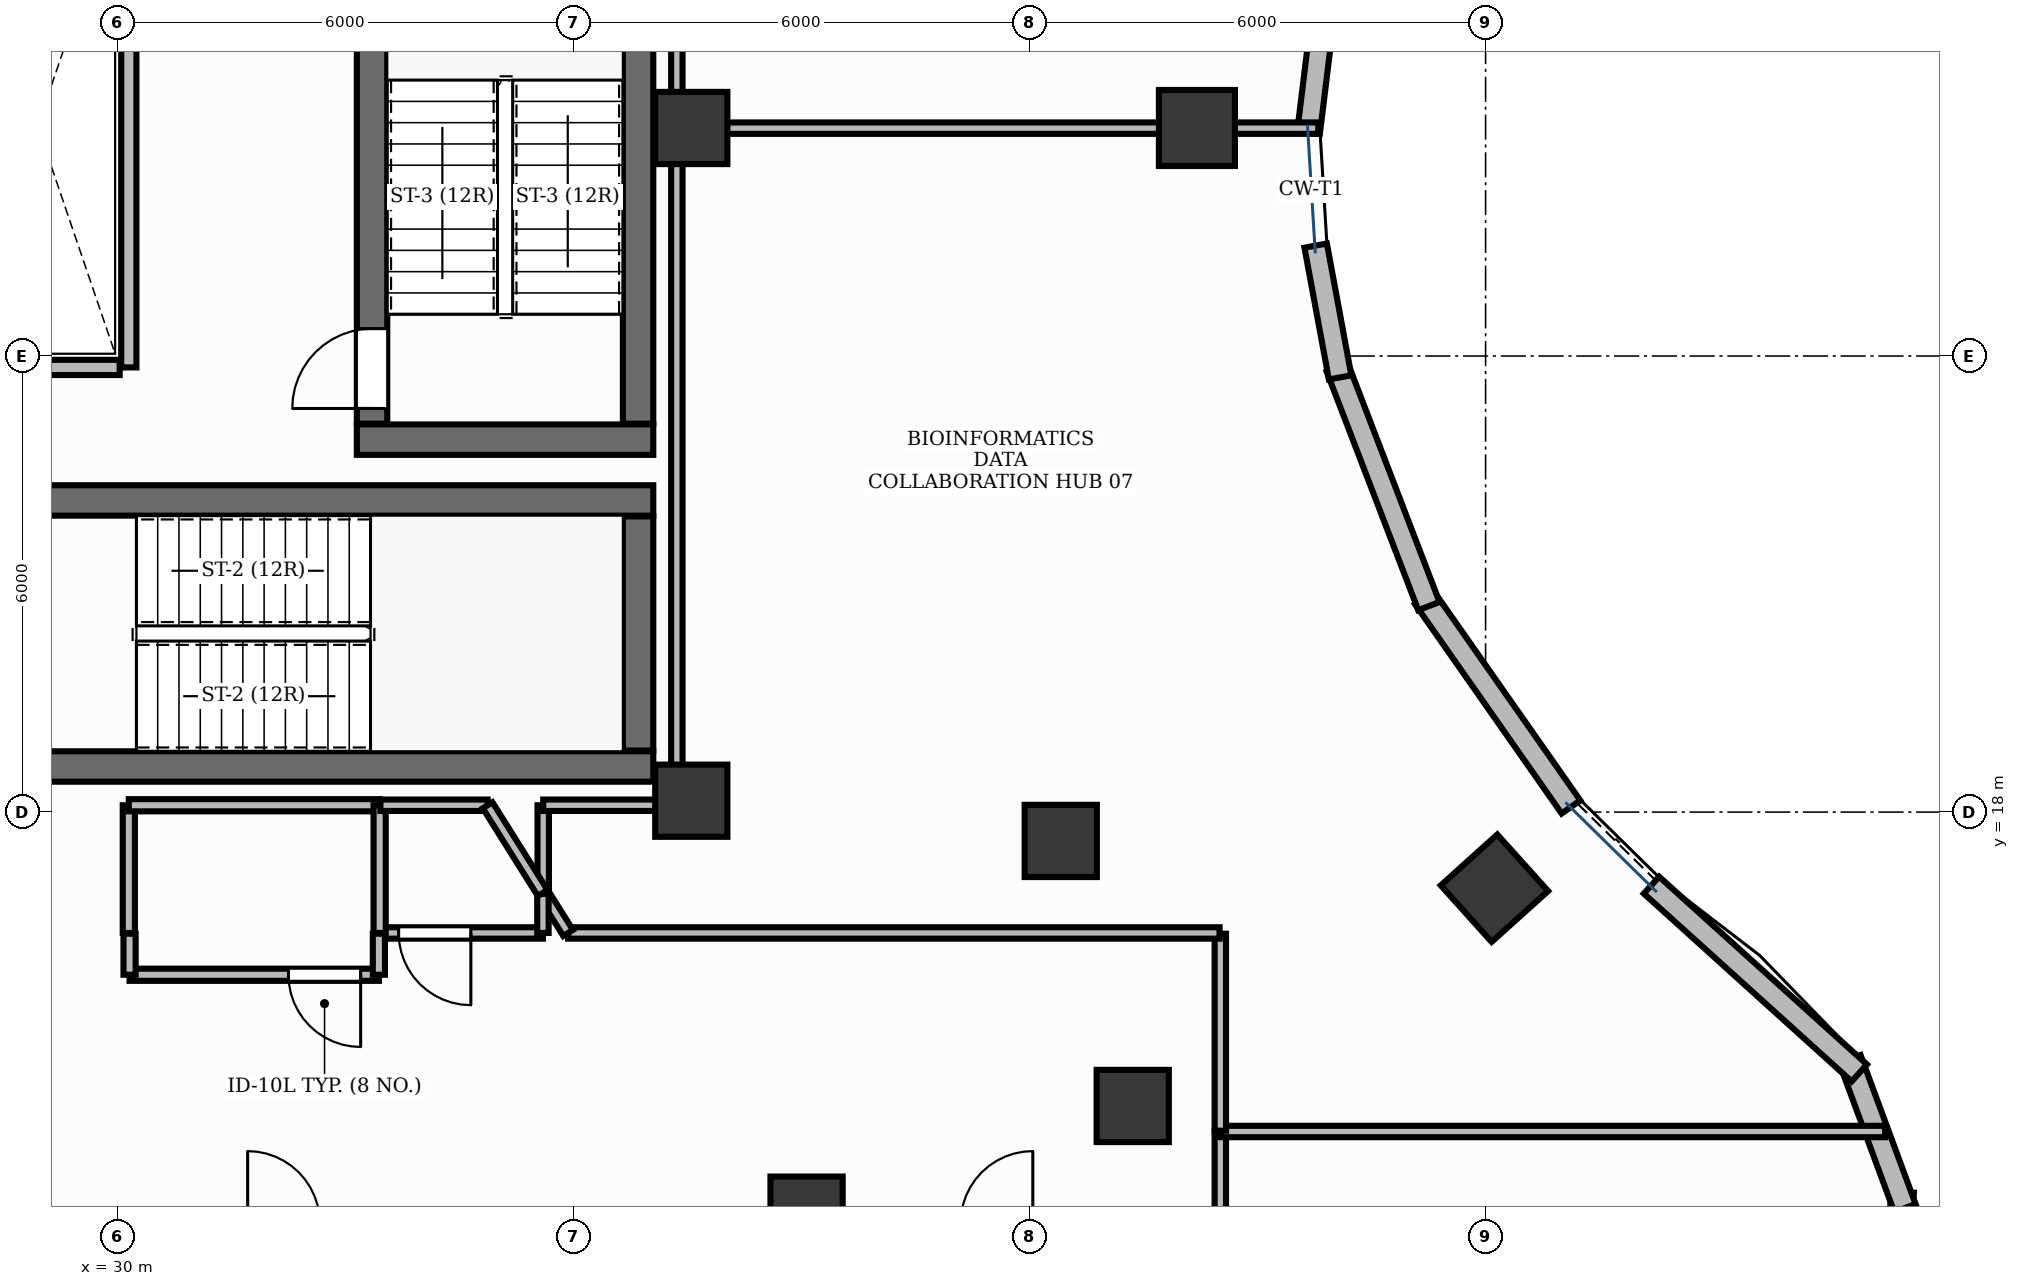
"""IFC4 building model, lengths in metres.
Left out: names, types, materials, properties, quantities, classifications, styles, units other than length and angle.
Written with IfcOpenShell. Run it as: python <this file> out.ifc"""

import sys

from ifc_helpers import new_model, si_unit, direction, frame, frame_2d, origin, origin_2d, place, context, subcontext, project, spatial, rectangle, extrude, element, fill, save


model = new_model("IFC4")
c1 = context("Model", 3, precision=1e-05, world=origin(), true_north=direction((0.0, 1.0)))
c2 = subcontext(c1, "Body", "Model", "MODEL_VIEW")
j1 = project(units=[si_unit("LENGTHUNIT", "METRE"), si_unit("PLANEANGLEUNIT", "RADIAN")], contexts=[c1])
p1 = place(None, origin())
s1 = spatial("IfcSite", under=j1, at=p1, CompositionType="ELEMENT")
p2 = place(p1, origin())
s2 = spatial("IfcBuilding", under=s1, at=p2, CompositionType="ELEMENT")
p3 = place(p2, frame((0.0, 0.0, 235.2)))
s3 = spatial("IfcBuildingStorey", under=s2, at=p3, CompositionType="ELEMENT", Elevation=235.2)
p4 = place(p3, frame((28.852, 18.6, 0.0), z_axis=(0.0, 0.0, 1.0), x_axis=(1.0, 0.0, 0.0)))
e1 = element("IfcWall", 1, at=p4, inside=s3, PredefinedType="SHEAR", context=c2, shape_type="SweptSolid", body=[
    extrude(rectangle(XDim=8.198, YDim=0.4, at=frame_2d((4.099, 0.0))), origin(), (0.0, 0.0, 1.0), 3.9),
])
p5 = place(p3, frame((28.4, 22.1, 0.0), z_axis=(0.0, 0.0, 1.0), x_axis=(1.0, 0.0, 0.0)))
e2 = element("IfcWall", 2, at=p5, inside=s3, PredefinedType="SHEAR", context=c2, shape_type="SweptSolid", body=[
    extrude(rectangle(XDim=8.65, YDim=0.4, at=frame_2d((4.325, 0.0))), origin(), (0.0, 0.0, 1.0), 3.9),
])
p6 = place(p3, frame((36.85, 18.81, 0.0), z_axis=(0.0, 0.0, 1.0), x_axis=(0.0, 1.0, 0.0)))
e3 = element("IfcWall", 3, at=p6, inside=s3, PredefinedType="SHEAR", context=c2, shape_type="SweptSolid", body=[
    extrude(rectangle(XDim=3.08, YDim=0.4, at=frame_2d((1.54, 0.0))), origin(), (0.0, 0.0, 1.0), 3.9),
])
p7 = place(p3, frame((33.15, 22.9, 0.0), z_axis=(0.0, 0.0, 1.0), x_axis=(1.0, 0.0, 0.0)))
e4 = element("IfcWall", 4, at=p7, inside=s3, PredefinedType="SHEAR", context=c2, shape_type="SweptSolid", body=[
    extrude(rectangle(XDim=3.9, YDim=0.4, at=frame_2d((1.95, 0.0))), origin(), (0.0, 0.0, 1.0), 3.9),
])
p8 = place(p3, frame((36.85, 23.11, 0.0), z_axis=(0.0, 0.0, 1.0), x_axis=(0.0, 1.0, 0.0)))
e5 = element("IfcWall", 5, at=p8, inside=s3, PredefinedType="SHEAR", context=c2, shape_type="SweptSolid", body=[
    extrude(rectangle(XDim=7.78, YDim=0.4, at=frame_2d((3.89, 0.0))), origin(), (0.0, 0.0, 1.0), 3.9),
])
p9 = place(p3, frame((33.35, 23.11, 0.0), z_axis=(0.0, 0.0, 1.0), x_axis=(0.0, 1.0, 0.0)))
e6 = element("IfcWall", 6, at=p9, inside=s3, PredefinedType="SHEAR", context=c2, shape_type="SweptSolid", body=[
    extrude(rectangle(XDim=7.78, YDim=0.4, at=frame_2d((3.89, 0.0))), origin(), (0.0, 0.0, 1.0), 3.9),
])
p10 = place(p9, frame((0.2, 0.0, 0.0)))
e7 = element("IfcOpeningElement", 7, at=p10, cuts=e6, PredefinedType="OPENING", context=c2, shape_type="SweptSolid", body=[
    extrude(rectangle(XDim=1.05, YDim=2.15, at=frame_2d((0.525, 1.075))), frame((0.0, 0.215, 0.0), z_axis=(0.0, -1.0, 0.0), x_axis=(1.0, 0.0, 0.0)), (0.0, 0.0, 1.0), 0.43),
])
for number, where, z_axis, x_axis in (
    (8, (37.55, 18.15, -0.0), (0.0, 0.0, 1.0), (1.0, 0.0, 0.0)),
    (9, (37.55, 27.0, -0.0), (0.0, 0.0, 1.0), (1.0, 0.0, 0.0)),
):
    element("IfcColumn", number, at=place(p3, frame(where, z_axis=z_axis, x_axis=x_axis)), inside=s3, PredefinedType="PILASTER", context=c2, shape_type="SweptSolid", body=[
        extrude(rectangle(XDim=0.95, YDim=0.95, at=origin_2d()), origin(), (0.0, 0.0, 1.0), 3.901),
    ])
for number, where, z_axis, x_axis in (
    (10, (39.067, 12.73, -0.0), (0.0, 0.0, 1.0), (1.0, 0.0, 0.0)),
    (11, (43.358, 14.134, -0.0), (0.0, 0.0, 1.0), (1.0, 0.0, 0.0)),
):
    element("IfcColumn", number, at=place(p3, frame(where, z_axis=z_axis, x_axis=x_axis)), inside=s3, PredefinedType="COLUMN", context=c2, shape_type="SweptSolid", body=[
        extrude(rectangle(XDim=0.95, YDim=0.95, at=origin_2d()), origin(), (0.0, 0.0, 1.0), 3.901),
    ])
p11 = place(p3, frame((48.116, 16.999, -0.0), z_axis=(0.0, 0.0, 1.0), x_axis=(-0.669130606359, 0.743144825477, 0.0)))
e12 = element("IfcColumn", 12, at=p11, inside=s3, PredefinedType="COLUMN", context=c2, shape_type="SweptSolid", body=[
    extrude(rectangle(XDim=1.0, YDim=1.0, at=origin_2d()), origin(), (0.0, 0.0, 1.0), 3.901),
])
p12 = place(p3, frame((42.411, 17.62, -0.0), z_axis=(0.0, 0.0, 1.0), x_axis=(1.0, 0.0, 0.0)))
e13 = element("IfcColumn", 13, at=p12, inside=s3, PredefinedType="COLUMN", context=c2, shape_type="SweptSolid", body=[
    extrude(rectangle(XDim=0.95, YDim=0.95, at=origin_2d()), origin(), (0.0, 0.0, 1.0), 3.901),
])
p13 = place(p3, frame((44.202, 27.0, -0.0), z_axis=(0.0, 0.0, 1.0), x_axis=(0.0, 1.0, 0.0)))
e14 = element("IfcColumn", 14, at=p13, inside=s3, PredefinedType="COLUMN", context=c2, shape_type="SweptSolid", body=[
    extrude(rectangle(XDim=1.0, YDim=1.0, at=origin_2d()), origin(), (0.0, 0.0, 1.0), 3.901),
])
for number, where, z_axis, x_axis in (
    (15, (53.356, 10.915, 0.0), (0.0, 0.0, 1.0), (0.062, 0.998, 0.0)),
    (16, (53.517, 12.791, 0.0), (0.0, 0.0, 1.0), (-0.346, 0.938, 0.0)),
):
    element("IfcWall", number, at=place(p3, frame(where, z_axis=z_axis, x_axis=x_axis)), inside=s3, PredefinedType="STANDARD", context=c2, shape_type="SweptSolid", body=[
        extrude(rectangle(XDim=2.091, YDim=0.3, at=frame_2d((1.046, 0.0))), origin(), (0.0, 0.0, 1.0), 3.9),
    ])
p14 = place(p3, frame((52.917, 14.569, 0.0), z_axis=(0.0, 0.0, 1.0), x_axis=(-0.742037796493, 0.670358045059, 0.0)))
e17 = element("IfcWall", 17, at=p14, inside=s3, PredefinedType="STANDARD", context=c2, shape_type="SweptSolid", body=[
    extrude(rectangle(XDim=3.685, YDim=0.3, at=frame_2d((1.843, 0.0))), origin(), (0.0, 0.0, 1.0), 3.9),
])
p15 = place(p3, frame((49.123, 18.067, 0.0), z_axis=(0.0, 0.0, 1.0), x_axis=(-0.573598849051, 0.819136350291, 0.0)))
e18 = element("IfcWall", 18, at=p15, inside=s3, PredefinedType="STANDARD", context=c2, shape_type="SweptSolid", body=[
    extrude(rectangle(XDim=3.361, YDim=0.3, at=frame_2d((1.68, 0.0))), origin(), (0.0, 0.0, 1.0), 3.9),
])
p16 = place(p3, frame((47.254, 20.71, 0.0), z_axis=(0.0, 0.0, 1.0), x_axis=(-0.358365624917, 0.933581318835, 0.0)))
e19 = element("IfcWall", 19, at=p16, inside=s3, PredefinedType="STANDARD", context=c2, shape_type="SweptSolid", body=[
    extrude(rectangle(XDim=3.361, YDim=0.3, at=frame_2d((1.68, 0.0))), origin(), (0.0, 0.0, 1.0), 3.9),
])
p17 = place(p3, frame((46.086, 23.719, 0.0), z_axis=(0.0, 0.0, 1.0), x_axis=(-0.182198328631, 0.983261800867, 0.0)))
e20 = element("IfcWall", 20, at=p17, inside=s3, PredefinedType="STANDARD", context=c2, shape_type="SweptSolid", body=[
    extrude(rectangle(XDim=1.763, YDim=0.3, at=frame_2d((0.882, 0.0))), origin(), (0.0, 0.0, 1.0), 3.9),
])
p18 = place(p3, frame((45.67, 26.938, 0.0), z_axis=(0.0, 0.0, 1.0), x_axis=(0.121834797873, 0.992550392689, 0.0)))
e21 = element("IfcWall", 21, at=p18, inside=s3, PredefinedType="STANDARD", context=c2, shape_type="SweptSolid", body=[
    extrude(rectangle(XDim=3.361, YDim=0.3, at=frame_2d((1.68, 0.0))), origin(), (0.0, 0.0, 1.0), 3.9),
])
p19 = place(p3, frame((30.15, 23.85, 0.0), z_axis=(0.0, 0.0, 1.0), x_axis=(0.0, 1.0, 0.0)))
e22 = element("IfcWall", 22, at=p19, inside=s3, PredefinedType="PARTITIONING", context=c2, shape_type="SweptSolid", body=[
    extrude(rectangle(XDim=6.35, YDim=0.2, at=frame_2d((3.175, 0.0))), origin(), (0.0, 0.0, 1.0), 2.91),
])
p20 = place(p3, frame((27.934, 23.85, 0.0), z_axis=(0.0, 0.0, 1.0), x_axis=(1.0, 0.0, 0.0)))
e23 = element("IfcWall", 23, at=p20, inside=s3, PredefinedType="PARTITIONING", context=c2, shape_type="SweptSolid", body=[
    extrude(rectangle(XDim=2.096, YDim=0.2, at=frame_2d((1.048, 0.0))), origin(), (0.0, 0.0, 1.0), 2.91),
])
p21 = place(p3, frame((33.44, 15.86, 0.0), z_axis=(0.0, 0.0, 1.0), x_axis=(-1.0, 0.0, 0.0)))
e24 = element("IfcWall", 24, at=p21, inside=s3, PredefinedType="PARTITIONING", context=c2, shape_type="SweptSolid", body=[
    extrude(rectangle(XDim=3.28, YDim=0.16, at=frame_2d((1.64, 0.0))), origin(), (0.0, 0.0, 1.0), 2.91),
])
p22 = place(p21, frame((0.24, 0.0, 0.0)))
e25 = element("IfcOpeningElement", 25, at=p22, cuts=e24, PredefinedType="OPENING", context=c2, shape_type="SweptSolid", body=[
    extrude(rectangle(XDim=0.95, YDim=2.15, at=frame_2d((0.475, 1.075))), frame((0.0, 0.095, 0.0), z_axis=(0.0, -1.0, 0.0), x_axis=(1.0, 0.0, 0.0)), (0.0, 0.0, 1.0), 0.19),
])
p23 = place(p3, frame((35.598, 16.41, 0.0), z_axis=(0.0, 0.0, 1.0), x_axis=(-1.0, 0.0, 0.0)))
e26 = element("IfcWall", 26, at=p23, inside=s3, PredefinedType="PARTITIONING", context=c2, shape_type="SweptSolid", body=[
    extrude(rectangle(XDim=2.138, YDim=0.15, at=frame_2d((1.069, 0.0))), origin(), (0.0, 0.0, 1.0), 2.91),
])
p24 = place(p23, frame((0.948, 0.0, 0.0)))
e27 = element("IfcOpeningElement", 27, at=p24, cuts=e26, PredefinedType="OPENING", context=c2, shape_type="SweptSolid", body=[
    extrude(rectangle(XDim=0.95, YDim=2.15, at=frame_2d((0.475, 1.075))), frame((0.0, 0.09, 0.0), z_axis=(0.0, -1.0, 0.0), x_axis=(1.0, 0.0, 0.0)), (0.0, 0.0, 1.0), 0.18),
])
for number, where, z_axis, x_axis in (
    (28, (33.44, 16.4, 0.0), (0.0, 0.0, 1.0), (0.0, -1.0, 0.0)),
    (29, (30.16, 15.86, 0.0), (0.0, 0.0, 1.0), (0.0, 1.0, 0.0)),
):
    element("IfcWall", number, at=place(p3, frame(where, z_axis=z_axis, x_axis=x_axis)), inside=s3, PredefinedType="PARTITIONING", context=c2, shape_type="SweptSolid", body=[
        extrude(rectangle(XDim=0.54, YDim=0.16, at=frame_2d((0.27, 0.0))), origin(), (0.0, 0.0, 1.0), 2.91),
    ])
p25 = place(p3, frame((30.15, 16.41, 0.0), z_axis=(0.0, 0.0, 1.0), x_axis=(0.0, 1.0, 0.0)))
e30 = element("IfcWall", 30, at=p25, inside=s3, PredefinedType="PARTITIONING", context=c2, shape_type="SweptSolid", body=[
    extrude(rectangle(XDim=1.68, YDim=0.16, at=frame_2d((0.84, 0.0))), origin(), (0.0, 0.0, 1.0), 2.91),
])
p26 = place(p3, frame((30.15, 18.09, 0.0), z_axis=(0.0, 0.0, 1.0), x_axis=(1.0, 0.0, 0.0)))
e31 = element("IfcWall", 31, at=p26, inside=s3, PredefinedType="PARTITIONING", context=c2, shape_type="SweptSolid", body=[
    extrude(rectangle(XDim=3.3, YDim=0.16, at=frame_2d((1.65, 0.0))), origin(), (0.0, 0.0, 1.0), 2.91),
])
p27 = place(p3, frame((33.45, 18.09, 0.0), z_axis=(0.0, 0.0, 1.0), x_axis=(0.0, -1.0, 0.0)))
e32 = element("IfcWall", 32, at=p27, inside=s3, PredefinedType="PARTITIONING", context=c2, shape_type="SweptSolid", body=[
    extrude(rectangle(XDim=1.68, YDim=0.16, at=frame_2d((0.84, 0.0))), origin(), (0.0, 0.0, 1.0), 2.91),
])
p28 = place(p3, frame((44.51, 12.6, 0.0), z_axis=(0.0, 0.0, 1.0), x_axis=(0.0, 1.0, 0.0)))
e33 = element("IfcWall", 33, at=p28, inside=s3, PredefinedType="PARTITIONING", context=c2, shape_type="SweptSolid", body=[
    extrude(rectangle(XDim=1.198, YDim=0.15, at=frame_2d((0.599, 0.0))), origin(), (0.0, 0.0, 1.0), 2.91),
])
p29 = place(p3, frame((44.51, 13.798, 0.0), z_axis=(0.0, 0.0, 1.0), x_axis=(1.0, 0.0, 0.0)))
e34 = element("IfcWall", 34, at=p29, inside=s3, PredefinedType="PARTITIONING", context=c2, shape_type="SweptSolid", body=[
    extrude(rectangle(XDim=8.745, YDim=0.15, at=frame_2d((4.373, 0.0))), origin(), (0.0, 0.0, 1.0), 2.91),
])
p30 = place(p3, frame((35.602, 16.938, 0.0), z_axis=(0.0, 0.0, 1.0), x_axis=(0.0, 1.0, 0.0)))
e35 = element("IfcWall", 35, at=p30, inside=s3, PredefinedType="PARTITIONING", context=c2, shape_type="SweptSolid", body=[
    extrude(rectangle(XDim=1.152, YDim=0.15, at=frame_2d((0.576, 0.0))), origin(), (0.0, 0.0, 1.0), 2.91),
])
p31 = place(p3, frame((35.602, 18.09, 0.0), z_axis=(0.0, 0.0, 1.0), x_axis=(1.0, 0.0, 0.0)))
e36 = element("IfcWall", 36, at=p31, inside=s3, PredefinedType="PARTITIONING", context=c2, shape_type="SweptSolid", body=[
    extrude(rectangle(XDim=1.748, YDim=0.15, at=frame_2d((0.874, 0.0))), origin(), (0.0, 0.0, 1.0), 2.91),
])
p32 = place(p3, frame((37.36, 18.1, 0.0), z_axis=(0.0, 0.0, 1.0), x_axis=(0.0, 1.0, 0.0)))
e37 = element("IfcWall", 37, at=p32, inside=s3, PredefinedType="PARTITIONING", context=c2, shape_type="SweptSolid", body=[
    extrude(rectangle(XDim=8.898, YDim=0.15, at=frame_2d((4.449, 0.0))), origin(), (0.0, 0.0, 1.0), 2.91),
])
p33 = place(p3, frame((37.36, 26.998, 0.0), z_axis=(0.0, 0.0, 1.0), x_axis=(1.0, 0.0, 0.0)))
e38 = element("IfcWall", 38, at=p33, inside=s3, PredefinedType="PARTITIONING", context=c2, shape_type="SweptSolid", body=[
    extrude(rectangle(XDim=8.439, YDim=0.15, at=frame_2d((4.219, 0.0))), origin(), (0.0, 0.0, 1.0), 2.91),
])
p34 = place(p3, frame((44.51, 13.808, 0.0), z_axis=(0.0, 0.0, 1.0), x_axis=(0.0, 1.0, 0.0)))
e39 = element("IfcWall", 39, at=p34, inside=s3, PredefinedType="PARTITIONING", context=c2, shape_type="SweptSolid", body=[
    extrude(rectangle(XDim=2.592, YDim=0.15, at=frame_2d((1.296, 0.0))), origin(), (0.0, 0.0, 1.0), 2.91),
])
p35 = place(p3, frame((44.5, 16.41, 0.0), z_axis=(0.0, 0.0, 1.0), x_axis=(-1.0, 0.0, 0.0)))
e40 = element("IfcWall", 40, at=p35, inside=s3, PredefinedType="PARTITIONING", context=c2, shape_type="SweptSolid", body=[
    extrude(rectangle(XDim=8.571, YDim=0.15, at=frame_2d((4.285, 0.0))), origin(), (0.0, 0.0, 1.0), 2.91),
])
p36 = place(p3, frame((35.929, 16.41, 0.0), z_axis=(0.0, 0.0, 1.0), x_axis=(-0.531474166757, 0.847074500897, 0.0)))
e41 = element("IfcWall", 41, at=p36, inside=s3, PredefinedType="PARTITIONING", context=c2, shape_type="SweptSolid", body=[
    extrude(rectangle(XDim=0.61, YDim=0.15, at=frame_2d((0.305, 0.0))), origin(), (0.0, 0.0, 1.0), 2.91),
])
p37 = place(p3, frame((35.598, 16.924, 0.0), z_axis=(0.0, 0.0, 1.0), x_axis=(0.0, -1.0, 0.0)))
e42 = element("IfcWall", 42, at=p37, inside=s3, PredefinedType="PARTITIONING", context=c2, shape_type="SweptSolid", body=[
    extrude(rectangle(XDim=0.514, YDim=0.15, at=frame_2d((0.257, 0.0))), origin(), (0.0, 0.0, 1.0), 2.91),
])
p38 = place(p3, frame((33.46, 18.09, 0.0), z_axis=(0.0, 0.0, 1.0), x_axis=(1.0, 0.0, 0.0)))
e43 = element("IfcWall", 43, at=p38, inside=s3, PredefinedType="PARTITIONING", context=c2, shape_type="SweptSolid", body=[
    extrude(rectangle(XDim=1.41, YDim=0.15, at=frame_2d((0.705, 0.0))), origin(), (0.0, 0.0, 1.0), 2.91),
])
p39 = place(p3, frame((34.87, 18.09, 0.0), z_axis=(0.0, 0.0, 1.0), x_axis=(0.531496113267, -0.847060730752, 0.0)))
e44 = element("IfcWall", 44, at=p39, inside=s3, PredefinedType="PARTITIONING", context=c2, shape_type="SweptSolid", body=[
    extrude(rectangle(XDim=1.362, YDim=0.15, at=frame_2d((0.681, 0.0))), origin(), (0.0, 0.0, 1.0), 2.91),
])
p40 = place(p3, frame((37.36, 27.052, 0.0), z_axis=(0.0, 0.0, 1.0), x_axis=(0.0, 1.0, 0.0)))
e45 = element("IfcWall", 45, at=p40, inside=s3, PredefinedType="PARTITIONING", context=c2, shape_type="SweptSolid", body=[
    extrude(rectangle(XDim=8.848, YDim=0.15, at=frame_2d((4.424, 0.0))), origin(), (0.0, 0.0, 1.0), 2.91),
])
p41 = place(p10, origin())
e46 = element("IfcDoor", 46, at=p41, inside=s3, OperationType="SINGLE_SWING_LEFT", PredefinedType="DOOR", context=c2, shape_type="SweptSolid", body=[
    extrude(rectangle(XDim=1.05, YDim=2.15, at=frame_2d((0.525, 1.075))), frame((0.0, 0.025, 0.0), z_axis=(0.0, -1.0, 0.0), x_axis=(1.0, 0.0, 0.0)), (0.0, 0.0, 1.0), 0.05),
])
fill(e7, e46)
p42 = place(p22, origin())
e47 = element("IfcDoor", 47, at=p42, inside=s3, OperationType="SINGLE_SWING_LEFT", PredefinedType="DOOR", context=c2, shape_type="SweptSolid", body=[
    extrude(rectangle(XDim=0.95, YDim=2.15, at=frame_2d((0.475, 1.075))), frame((0.0, 0.025, 0.0), z_axis=(0.0, -1.0, 0.0), x_axis=(1.0, 0.0, 0.0)), (0.0, 0.0, 1.0), 0.05),
])
fill(e25, e47)
p43 = place(p24, origin())
e48 = element("IfcDoor", 48, at=p43, inside=s3, OperationType="SINGLE_SWING_LEFT", PredefinedType="DOOR", context=c2, shape_type="SweptSolid", body=[
    extrude(rectangle(XDim=0.95, YDim=2.15, at=frame_2d((0.475, 1.075))), frame((0.0, 0.025, 0.0), z_axis=(0.0, -1.0, 0.0), x_axis=(1.0, 0.0, 0.0)), (0.0, 0.0, 1.0), 0.05),
])
fill(e27, e48)
save(model, sys.argv[1])
